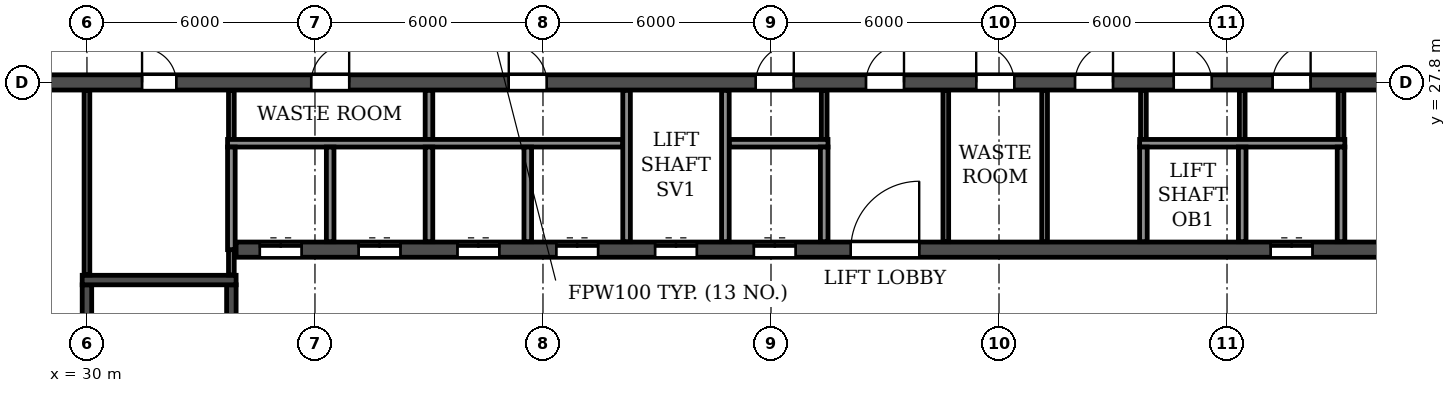
"""IFC4 building model, lengths in metres.
Left out: names, types, materials, properties, quantities, classifications, styles, units other than length and angle.
Written with IfcOpenShell. Run it as: python <this file> out.ifc"""

import sys

from ifc_helpers import new_model, si_unit, direction, frame, frame_2d, origin, place, context, subcontext, project, spatial, rectangle, extrude, element, fill, save


model = new_model("IFC4")
c1 = context("Model", 3, precision=1e-05, world=origin(), true_north=direction((0.0, 1.0)))
c2 = subcontext(c1, "Body", "Model", "MODEL_VIEW")
j1 = project(units=[si_unit("LENGTHUNIT", "METRE"), si_unit("PLANEANGLEUNIT", "RADIAN")], contexts=[c1])
p1 = place(None, origin())
s1 = spatial("IfcSite", under=j1, at=p1, CompositionType="ELEMENT")
p2 = place(p1, origin())
s2 = spatial("IfcBuilding", under=s1, at=p2, CompositionType="ELEMENT")
p3 = place(p2, frame((0.0, 0.0, 201.6)))
s3 = spatial("IfcBuildingStorey", under=s2, at=p3, CompositionType="ELEMENT", Elevation=201.6)
p4 = place(p3, frame((18.2, 27.8, 0.0), z_axis=(0.0, 0.0, 1.0), x_axis=(1.0, 0.0, 0.0)))
e1 = element("IfcWall", 1, at=p4, inside=s3, PredefinedType="SOLIDWALL", context=c2, shape_type="SweptSolid", body=[
    extrude(rectangle(XDim=65.6, YDim=0.4, at=frame_2d((32.8, 0.0))), origin(), (0.0, 0.0, 1.0), 3.08),
])
p5 = place(p4, frame((0.7, 0.0, 0.0)))
e2 = element("IfcOpeningElement", 2, at=p5, cuts=e1, PredefinedType="OPENING", context=c2, shape_type="SweptSolid", body=[
    extrude(rectangle(XDim=1.0, YDim=2.1, at=frame_2d((0.5, 1.05))), frame((0.0, 0.21, 0.0), z_axis=(0.0, -1.0, 0.0), x_axis=(1.0, 0.0, 0.0)), (0.0, 0.0, 1.0), 0.42),
])
p6 = place(p4, frame((4.05, 0.0, 0.0)))
e3 = element("IfcOpeningElement", 3, at=p6, cuts=e1, PredefinedType="OPENING", context=c2, shape_type="SweptSolid", body=[
    extrude(rectangle(XDim=0.9, YDim=2.1, at=frame_2d((0.45, 1.05))), frame((0.0, 0.21, 0.0), z_axis=(0.0, -1.0, 0.0), x_axis=(1.0, 0.0, 0.0)), (0.0, 0.0, 1.0), 0.42),
])
p7 = place(p4, frame((13.25, 0.0, 0.0)))
e4 = element("IfcOpeningElement", 4, at=p7, cuts=e1, PredefinedType="OPENING", context=c2, shape_type="SweptSolid", body=[
    extrude(rectangle(XDim=0.9, YDim=2.1, at=frame_2d((0.45, 1.05))), frame((0.0, 0.21, 0.0), z_axis=(0.0, -1.0, 0.0), x_axis=(1.0, 0.0, 0.0)), (0.0, 0.0, 1.0), 0.42),
])
p8 = place(p4, frame((17.7, 0.0, 0.0)))
e5 = element("IfcOpeningElement", 5, at=p8, cuts=e1, PredefinedType="OPENING", context=c2, shape_type="SweptSolid", body=[
    extrude(rectangle(XDim=1.0, YDim=2.1, at=frame_2d((0.5, 1.05))), frame((0.0, 0.21, 0.0), z_axis=(0.0, -1.0, 0.0), x_axis=(1.0, 0.0, 0.0)), (0.0, 0.0, 1.0), 0.42),
])
p9 = place(p4, frame((22.9, 0.0, 0.0)))
e6 = element("IfcOpeningElement", 6, at=p9, cuts=e1, PredefinedType="OPENING", context=c2, shape_type="SweptSolid", body=[
    extrude(rectangle(XDim=1.0, YDim=2.1, at=frame_2d((0.5, 1.05))), frame((0.0, 0.21, 0.0), z_axis=(0.0, -1.0, 0.0), x_axis=(1.0, 0.0, 0.0)), (0.0, 0.0, 1.0), 0.42),
])
p10 = place(p4, frame((29.4, 0.0, 0.0)))
e7 = element("IfcOpeningElement", 7, at=p10, cuts=e1, PredefinedType="OPENING", context=c2, shape_type="SweptSolid", body=[
    extrude(rectangle(XDim=1.0, YDim=2.1, at=frame_2d((0.5, 1.05))), frame((0.0, 0.21, 0.0), z_axis=(0.0, -1.0, 0.0), x_axis=(1.0, 0.0, 0.0)), (0.0, 0.0, 1.0), 0.42),
])
p11 = place(p4, frame((32.3, 0.0, 0.0)))
e8 = element("IfcOpeningElement", 8, at=p11, cuts=e1, PredefinedType="OPENING", context=c2, shape_type="SweptSolid", body=[
    extrude(rectangle(XDim=1.0, YDim=2.1, at=frame_2d((0.5, 1.05))), frame((0.0, 0.21, 0.0), z_axis=(0.0, -1.0, 0.0), x_axis=(1.0, 0.0, 0.0)), (0.0, 0.0, 1.0), 0.42),
])
p12 = place(p4, frame((35.2, 0.0, 0.0)))
e9 = element("IfcOpeningElement", 9, at=p12, cuts=e1, PredefinedType="OPENING", context=c2, shape_type="SweptSolid", body=[
    extrude(rectangle(XDim=1.0, YDim=2.1, at=frame_2d((0.5, 1.05))), frame((0.0, 0.21, 0.0), z_axis=(0.0, -1.0, 0.0), x_axis=(1.0, 0.0, 0.0)), (0.0, 0.0, 1.0), 0.42),
])
p13 = place(p4, frame((37.8, 0.0, 0.0)))
e10 = element("IfcOpeningElement", 10, at=p13, cuts=e1, PredefinedType="OPENING", context=c2, shape_type="SweptSolid", body=[
    extrude(rectangle(XDim=1.0, YDim=2.1, at=frame_2d((0.5, 1.05))), frame((0.0, 0.21, 0.0), z_axis=(0.0, -1.0, 0.0), x_axis=(1.0, 0.0, 0.0)), (0.0, 0.0, 1.0), 0.42),
])
p14 = place(p4, frame((40.4, 0.0, 0.0)))
e11 = element("IfcOpeningElement", 11, at=p14, cuts=e1, PredefinedType="OPENING", context=c2, shape_type="SweptSolid", body=[
    extrude(rectangle(XDim=1.0, YDim=2.1, at=frame_2d((0.5, 1.05))), frame((0.0, 0.21, 0.0), z_axis=(0.0, -1.0, 0.0), x_axis=(1.0, 0.0, 0.0)), (0.0, 0.0, 1.0), 0.42),
])
p15 = place(p4, frame((43.0, 0.0, 0.0)))
e12 = element("IfcOpeningElement", 12, at=p15, cuts=e1, PredefinedType="OPENING", context=c2, shape_type="SweptSolid", body=[
    extrude(rectangle(XDim=1.0, YDim=2.1, at=frame_2d((0.5, 1.05))), frame((0.0, 0.21, 0.0), z_axis=(0.0, -1.0, 0.0), x_axis=(1.0, 0.0, 0.0)), (0.0, 0.0, 1.0), 0.42),
])
p16 = place(p4, frame((46.9, 0.0, 0.0)))
e13 = element("IfcOpeningElement", 13, at=p16, cuts=e1, PredefinedType="OPENING", context=c2, shape_type="SweptSolid", body=[
    extrude(rectangle(XDim=1.0, YDim=2.1, at=frame_2d((0.5, 1.05))), frame((0.0, 0.21, 0.0), z_axis=(0.0, -1.0, 0.0), x_axis=(1.0, 0.0, 0.0)), (0.0, 0.0, 1.0), 0.42),
])
p17 = place(p4, frame((51.45, 0.0, 0.0)))
e14 = element("IfcOpeningElement", 14, at=p17, cuts=e1, PredefinedType="OPENING", context=c2, shape_type="SweptSolid", body=[
    extrude(rectangle(XDim=0.9, YDim=2.1, at=frame_2d((0.45, 1.05))), frame((0.0, 0.21, 0.0), z_axis=(0.0, -1.0, 0.0), x_axis=(1.0, 0.0, 0.0)), (0.0, 0.0, 1.0), 0.42),
])
p18 = place(p4, frame((60.65, 0.0, 0.0)))
e15 = element("IfcOpeningElement", 15, at=p18, cuts=e1, PredefinedType="OPENING", context=c2, shape_type="SweptSolid", body=[
    extrude(rectangle(XDim=0.9, YDim=2.1, at=frame_2d((0.45, 1.05))), frame((0.0, 0.21, 0.0), z_axis=(0.0, -1.0, 0.0), x_axis=(1.0, 0.0, 0.0)), (0.0, 0.0, 1.0), 0.42),
])
p19 = place(p4, frame((63.9, 0.0, 0.0)))
e16 = element("IfcOpeningElement", 16, at=p19, cuts=e1, PredefinedType="OPENING", context=c2, shape_type="SweptSolid", body=[
    extrude(rectangle(XDim=1.0, YDim=2.1, at=frame_2d((0.5, 1.05))), frame((0.0, 0.21, 0.0), z_axis=(0.0, -1.0, 0.0), x_axis=(1.0, 0.0, 0.0)), (0.0, 0.0, 1.0), 0.42),
])
p20 = place(p3, frame((33.925, 23.4, 0.0), z_axis=(0.0, 0.0, 1.0), x_axis=(1.0, 0.0, 0.0)))
e17 = element("IfcWall", 17, at=p20, inside=s3, PredefinedType="SOLIDWALL", context=c2, shape_type="SweptSolid", body=[
    extrude(rectangle(XDim=34.15, YDim=0.4, at=frame_2d((17.075, 0.0))), origin(), (0.0, 0.0, 1.0), 3.08),
])
p21 = place(p20, frame((16.175, 0.0, 0.0)))
e18 = element("IfcOpeningElement", 18, at=p21, cuts=e17, PredefinedType="OPENING", context=c2, shape_type="SweptSolid", body=[
    extrude(rectangle(XDim=1.8, YDim=2.1, at=frame_2d((0.9, 1.05))), frame((0.0, 0.21, 0.0), z_axis=(0.0, -1.0, 0.0), x_axis=(1.0, 0.0, 0.0)), (0.0, 0.0, 1.0), 0.42),
])
p22 = place(p20, frame((0.625, 0.0, 0.0)))
e19 = element("IfcOpeningElement", 19, at=p22, cuts=e17, PredefinedType="OPENING", context=c2, shape_type="SweptSolid", body=[
    extrude(rectangle(XDim=1.1, YDim=2.1, at=frame_2d((0.55, 1.05))), frame((0.0, 0.21, 0.0), z_axis=(0.0, -1.0, 0.0), x_axis=(1.0, 0.0, 0.0)), (0.0, 0.0, 1.0), 0.42),
])
p23 = place(p20, frame((3.225, 0.0, 0.0)))
e20 = element("IfcOpeningElement", 20, at=p23, cuts=e17, PredefinedType="OPENING", context=c2, shape_type="SweptSolid", body=[
    extrude(rectangle(XDim=1.1, YDim=2.1, at=frame_2d((0.55, 1.05))), frame((0.0, 0.21, 0.0), z_axis=(0.0, -1.0, 0.0), x_axis=(1.0, 0.0, 0.0)), (0.0, 0.0, 1.0), 0.42),
])
p24 = place(p20, frame((5.825, 0.0, 0.0)))
e21 = element("IfcOpeningElement", 21, at=p24, cuts=e17, PredefinedType="OPENING", context=c2, shape_type="SweptSolid", body=[
    extrude(rectangle(XDim=1.1, YDim=2.1, at=frame_2d((0.55, 1.05))), frame((0.0, 0.21, 0.0), z_axis=(0.0, -1.0, 0.0), x_axis=(1.0, 0.0, 0.0)), (0.0, 0.0, 1.0), 0.42),
])
p25 = place(p20, frame((8.425, 0.0, 0.0)))
e22 = element("IfcOpeningElement", 22, at=p25, cuts=e17, PredefinedType="OPENING", context=c2, shape_type="SweptSolid", body=[
    extrude(rectangle(XDim=1.1, YDim=2.1, at=frame_2d((0.55, 1.05))), frame((0.0, 0.21, 0.0), z_axis=(0.0, -1.0, 0.0), x_axis=(1.0, 0.0, 0.0)), (0.0, 0.0, 1.0), 0.42),
])
p26 = place(p20, frame((11.025, 0.0, 0.0)))
e23 = element("IfcOpeningElement", 23, at=p26, cuts=e17, PredefinedType="OPENING", context=c2, shape_type="SweptSolid", body=[
    extrude(rectangle(XDim=1.1, YDim=2.1, at=frame_2d((0.55, 1.05))), frame((0.0, 0.21, 0.0), z_axis=(0.0, -1.0, 0.0), x_axis=(1.0, 0.0, 0.0)), (0.0, 0.0, 1.0), 0.42),
])
p27 = place(p20, frame((13.625, 0.0, 0.0)))
e24 = element("IfcOpeningElement", 24, at=p27, cuts=e17, PredefinedType="OPENING", context=c2, shape_type="SweptSolid", body=[
    extrude(rectangle(XDim=1.1, YDim=2.1, at=frame_2d((0.55, 1.05))), frame((0.0, 0.21, 0.0), z_axis=(0.0, -1.0, 0.0), x_axis=(1.0, 0.0, 0.0)), (0.0, 0.0, 1.0), 0.42),
])
p28 = place(p20, frame((27.225, 0.0, 0.0)))
e25 = element("IfcOpeningElement", 25, at=p28, cuts=e17, PredefinedType="OPENING", context=c2, shape_type="SweptSolid", body=[
    extrude(rectangle(XDim=1.1, YDim=2.1, at=frame_2d((0.55, 1.05))), frame((0.0, 0.21, 0.0), z_axis=(0.0, -1.0, 0.0), x_axis=(1.0, 0.0, 0.0)), (0.0, 0.0, 1.0), 0.42),
])
p29 = place(p3, frame((30.0, 14.8, 0.0), z_axis=(0.0, 0.0, 1.0), x_axis=(0.0, 1.0, 0.0)))
e26 = element("IfcWall", 26, at=p29, inside=s3, PredefinedType="SOLIDWALL", context=c2, shape_type="SweptSolid", body=[
    extrude(rectangle(XDim=7.675, YDim=0.25, at=frame_2d((3.837, 0.0))), origin(), (0.0, 0.0, 1.0), 3.08),
])
p30 = place(p3, frame((33.8, 14.8, 0.0), z_axis=(0.0, 0.0, 1.0), x_axis=(0.0, 1.0, 0.0)))
e27 = element("IfcWall", 27, at=p30, inside=s3, PredefinedType="SOLIDWALL", context=c2, shape_type="SweptSolid", body=[
    extrude(rectangle(XDim=7.675, YDim=0.25, at=frame_2d((3.837, 0.0))), origin(), (0.0, 0.0, 1.0), 3.08),
])
p31 = place(p30, frame((0.5, 0.0, 0.0)))
e28 = element("IfcOpeningElement", 28, at=p31, cuts=e27, PredefinedType="OPENING", context=c2, shape_type="SweptSolid", body=[
    extrude(rectangle(XDim=1.0, YDim=2.1, at=frame_2d((0.5, 1.05))), frame((0.0, 0.135, 0.0), z_axis=(0.0, -1.0, 0.0), x_axis=(1.0, 0.0, 0.0)), (0.0, 0.0, 1.0), 0.27),
])
p32 = place(p3, frame((29.875, 22.6, 0.0), z_axis=(0.0, 0.0, 1.0), x_axis=(1.0, 0.0, 0.0)))
e29 = element("IfcWall", 29, at=p32, inside=s3, PredefinedType="SOLIDWALL", context=c2, shape_type="SweptSolid", body=[
    extrude(rectangle(XDim=4.05, YDim=0.25, at=frame_2d((2.025, 0.0))), origin(), (0.0, 0.0, 1.0), 3.08),
])
p33 = place(p3, frame((49.4, 26.3, 0.0), z_axis=(0.0, 0.0, 1.0), x_axis=(0.0, 1.0, 0.0)))
e30 = element("IfcWall", 30, at=p33, inside=s3, PredefinedType="PARTITIONING", context=c2, shape_type="SweptSolid", body=[
    extrude(rectangle(XDim=1.29, YDim=0.15, at=frame_2d((0.645, 0.0))), origin(), (0.0, 0.0, 1.0), 3.08),
])
for number, where, z_axis, x_axis in (
    (31, (52.6, 23.61, 0.0), (0.0, 0.0, 1.0), (0.0, 1.0, 0.0)),
    (32, (55.2, 23.61, 0.0), (0.0, 0.0, 1.0), (0.0, 1.0, 0.0)),
):
    element("IfcWall", number, at=place(p3, frame(where, z_axis=z_axis, x_axis=x_axis)), inside=s3, PredefinedType="PARTITIONING", context=c2, shape_type="SweptSolid", body=[
        extrude(rectangle(XDim=3.98, YDim=0.15, at=frame_2d((1.99, 0.0))), origin(), (0.0, 0.0, 1.0), 3.08),
    ])
for number, where, z_axis, x_axis in (
    (33, (57.8, 26.3, 0.0), (0.0, 0.0, 1.0), (0.0, 1.0, 0.0)),
    (34, (60.4, 26.3, 0.0), (0.0, 0.0, 1.0), (0.0, 1.0, 0.0)),
    (35, (63.0, 26.3, 0.0), (0.0, 0.0, 1.0), (0.0, 1.0, 0.0)),
):
    element("IfcWall", number, at=place(p3, frame(where, z_axis=z_axis, x_axis=x_axis)), inside=s3, PredefinedType="PARTITIONING", context=c2, shape_type="SweptSolid", body=[
        extrude(rectangle(XDim=1.29, YDim=0.15, at=frame_2d((0.645, 0.0))), origin(), (0.0, 0.0, 1.0), 3.08),
    ])
p34 = place(p3, frame((39.0, 26.3, 0.0), z_axis=(0.0, 0.0, 1.0), x_axis=(0.0, 1.0, 0.0)))
e36 = element("IfcWall", 36, at=p34, inside=s3, PredefinedType="PARTITIONING", context=c2, shape_type="SweptSolid", body=[
    extrude(rectangle(XDim=1.29, YDim=0.2, at=frame_2d((0.645, 0.0))), origin(), (0.0, 0.0, 1.0), 3.08),
])
p35 = place(p3, frame((30.0, 22.735, 0.0), z_axis=(0.0, 0.0, 1.0), x_axis=(0.0, 1.0, 0.0)))
e37 = element("IfcWall", 37, at=p35, inside=s3, PredefinedType="PARTITIONING", context=c2, shape_type="SweptSolid", body=[
    extrude(rectangle(XDim=4.855, YDim=0.15, at=frame_2d((2.427, 0.0))), origin(), (0.0, 0.0, 1.0), 3.08),
])
p36 = place(p3, frame((33.8, 22.735, 0.0), z_axis=(0.0, 0.0, 1.0), x_axis=(0.0, 1.0, 0.0)))
e38 = element("IfcWall", 38, at=p36, inside=s3, PredefinedType="PARTITIONING", context=c2, shape_type="SweptSolid", body=[
    extrude(rectangle(XDim=0.665, YDim=0.15, at=frame_2d((0.333, 0.0))), origin(), (0.0, 0.0, 1.0), 3.08),
])
p37 = place(p3, frame((33.8, 26.3, 0.0), z_axis=(0.0, 0.0, 1.0), x_axis=(0.0, 1.0, 0.0)))
e39 = element("IfcWall", 39, at=p37, inside=s3, PredefinedType="PARTITIONING", context=c2, shape_type="SweptSolid", body=[
    extrude(rectangle(XDim=1.29, YDim=0.15, at=frame_2d((0.645, 0.0))), origin(), (0.0, 0.0, 1.0), 3.08),
])
p38 = place(p3, frame((33.7, 26.2, 0.0), z_axis=(0.0, 0.0, 1.0), x_axis=(1.0, 0.0, 0.0)))
e40 = element("IfcWall", 40, at=p38, inside=s3, PredefinedType="PARTITIONING", context=c2, shape_type="SweptSolid", body=[
    extrude(rectangle(XDim=10.4, YDim=0.2, at=frame_2d((5.2, 0.0))), origin(), (0.0, 0.0, 1.0), 3.08),
])
p39 = place(p3, frame((46.9, 26.2, 0.0), z_axis=(0.0, 0.0, 1.0), x_axis=(1.0, 0.0, 0.0)))
e41 = element("IfcWall", 41, at=p39, inside=s3, PredefinedType="PARTITIONING", context=c2, shape_type="SweptSolid", body=[
    extrude(rectangle(XDim=2.6, YDim=0.2, at=frame_2d((1.3, 0.0))), origin(), (0.0, 0.0, 1.0), 3.08),
])
p40 = place(p3, frame((57.7, 26.2, 0.0), z_axis=(0.0, 0.0, 1.0), x_axis=(1.0, 0.0, 0.0)))
e42 = element("IfcWall", 42, at=p40, inside=s3, PredefinedType="PARTITIONING", context=c2, shape_type="SweptSolid", body=[
    extrude(rectangle(XDim=5.4, YDim=0.2, at=frame_2d((2.7, 0.0))), origin(), (0.0, 0.0, 1.0), 3.08),
])
p41 = place(p3, frame((33.8, 23.4, 0.0), z_axis=(0.0, 0.0, 1.0), x_axis=(0.0, 1.0, 0.0)))
e43 = element("IfcWall", 43, at=p41, inside=s3, PredefinedType="PARTITIONING", context=c2, shape_type="SweptSolid", body=[
    extrude(rectangle(XDim=2.7, YDim=0.2, at=frame_2d((1.35, 0.0))), origin(), (0.0, 0.0, 1.0), 3.08),
])
for number, where, z_axis, x_axis in (
    (44, (36.4, 23.61, 0.0), (0.0, 0.0, 1.0), (0.0, 1.0, 0.0)),
    (45, (39.0, 23.61, 0.0), (0.0, 0.0, 1.0), (0.0, 1.0, 0.0)),
    (46, (41.6, 23.61, 0.0), (0.0, 0.0, 1.0), (0.0, 1.0, 0.0)),
):
    element("IfcWall", number, at=place(p3, frame(where, z_axis=z_axis, x_axis=x_axis)), inside=s3, PredefinedType="PARTITIONING", context=c2, shape_type="SweptSolid", body=[
        extrude(rectangle(XDim=2.49, YDim=0.2, at=frame_2d((1.245, 0.0))), origin(), (0.0, 0.0, 1.0), 3.08),
    ])
for number, where, z_axis, x_axis in (
    (47, (44.2, 23.61, 0.0), (0.0, 0.0, 1.0), (0.0, 1.0, 0.0)),
    (48, (46.8, 23.61, 0.0), (0.0, 0.0, 1.0), (0.0, 1.0, 0.0)),
):
    element("IfcWall", number, at=place(p3, frame(where, z_axis=z_axis, x_axis=x_axis)), inside=s3, PredefinedType="PARTITIONING", context=c2, shape_type="SweptSolid", body=[
        extrude(rectangle(XDim=3.98, YDim=0.2, at=frame_2d((1.99, 0.0))), origin(), (0.0, 0.0, 1.0), 3.08),
    ])
for number, where, z_axis, x_axis in (
    (49, (49.4, 23.61, 0.0), (0.0, 0.0, 1.0), (0.0, 1.0, 0.0)),
    (50, (57.8, 23.61, 0.0), (0.0, 0.0, 1.0), (0.0, 1.0, 0.0)),
    (51, (60.4, 23.61, 0.0), (0.0, 0.0, 1.0), (0.0, 1.0, 0.0)),
    (52, (63.0, 23.61, 0.0), (0.0, 0.0, 1.0), (0.0, 1.0, 0.0)),
):
    element("IfcWall", number, at=place(p3, frame(where, z_axis=z_axis, x_axis=x_axis)), inside=s3, PredefinedType="PARTITIONING", context=c2, shape_type="SweptSolid", body=[
        extrude(rectangle(XDim=2.49, YDim=0.2, at=frame_2d((1.245, 0.0))), origin(), (0.0, 0.0, 1.0), 3.08),
    ])
p42 = place(p7, origin())
e53 = element("IfcDoor", 53, at=p42, inside=s3, OperationType="SINGLE_SWING_LEFT", PredefinedType="DOOR", context=c2, shape_type="SweptSolid", body=[
    extrude(rectangle(XDim=0.9, YDim=2.1, at=frame_2d((0.45, 1.05))), frame((0.0, 0.025, 0.0), z_axis=(0.0, -1.0, 0.0), x_axis=(1.0, 0.0, 0.0)), (0.0, 0.0, 1.0), 0.05),
])
fill(e4, e53)
p43 = place(p8, origin())
e54 = element("IfcDoor", 54, at=p43, inside=s3, OperationType="SINGLE_SWING_RIGHT", PredefinedType="DOOR", context=c2, shape_type="SweptSolid", body=[
    extrude(rectangle(XDim=1.0, YDim=2.1, at=frame_2d((0.5, 1.05))), frame((0.0, 0.025, 0.0), z_axis=(0.0, -1.0, 0.0), x_axis=(1.0, 0.0, 0.0)), (0.0, 0.0, 1.0), 0.05),
])
fill(e5, e54)
p44 = place(p9, origin())
e55 = element("IfcDoor", 55, at=p44, inside=s3, OperationType="SINGLE_SWING_LEFT", PredefinedType="DOOR", context=c2, shape_type="SweptSolid", body=[
    extrude(rectangle(XDim=1.0, YDim=2.1, at=frame_2d((0.5, 1.05))), frame((0.0, 0.025, 0.0), z_axis=(0.0, -1.0, 0.0), x_axis=(1.0, 0.0, 0.0)), (0.0, 0.0, 1.0), 0.05),
])
fill(e6, e55)
p45 = place(p10, origin())
e56 = element("IfcDoor", 56, at=p45, inside=s3, OperationType="SINGLE_SWING_RIGHT", PredefinedType="DOOR", context=c2, shape_type="SweptSolid", body=[
    extrude(rectangle(XDim=1.0, YDim=2.1, at=frame_2d((0.5, 1.05))), frame((0.0, 0.025, 0.0), z_axis=(0.0, -1.0, 0.0), x_axis=(1.0, 0.0, 0.0)), (0.0, 0.0, 1.0), 0.05),
])
fill(e7, e56)
p46 = place(p11, origin())
e57 = element("IfcDoor", 57, at=p46, inside=s3, OperationType="SINGLE_SWING_RIGHT", PredefinedType="DOOR", context=c2, shape_type="SweptSolid", body=[
    extrude(rectangle(XDim=1.0, YDim=2.1, at=frame_2d((0.5, 1.05))), frame((0.0, 0.025, 0.0), z_axis=(0.0, -1.0, 0.0), x_axis=(1.0, 0.0, 0.0)), (0.0, 0.0, 1.0), 0.05),
])
fill(e8, e57)
p47 = place(p12, origin())
e58 = element("IfcDoor", 58, at=p47, inside=s3, OperationType="SINGLE_SWING_LEFT", PredefinedType="DOOR", context=c2, shape_type="SweptSolid", body=[
    extrude(rectangle(XDim=1.0, YDim=2.1, at=frame_2d((0.5, 1.05))), frame((0.0, 0.025, 0.0), z_axis=(0.0, -1.0, 0.0), x_axis=(1.0, 0.0, 0.0)), (0.0, 0.0, 1.0), 0.05),
])
fill(e9, e58)
p48 = place(p13, origin())
e59 = element("IfcDoor", 59, at=p48, inside=s3, OperationType="SINGLE_SWING_RIGHT", PredefinedType="DOOR", context=c2, shape_type="SweptSolid", body=[
    extrude(rectangle(XDim=1.0, YDim=2.1, at=frame_2d((0.5, 1.05))), frame((0.0, 0.025, 0.0), z_axis=(0.0, -1.0, 0.0), x_axis=(1.0, 0.0, 0.0)), (0.0, 0.0, 1.0), 0.05),
])
fill(e10, e59)
p49 = place(p14, origin())
e60 = element("IfcDoor", 60, at=p49, inside=s3, OperationType="SINGLE_SWING_LEFT", PredefinedType="DOOR", context=c2, shape_type="SweptSolid", body=[
    extrude(rectangle(XDim=1.0, YDim=2.1, at=frame_2d((0.5, 1.05))), frame((0.0, 0.025, 0.0), z_axis=(0.0, -1.0, 0.0), x_axis=(1.0, 0.0, 0.0)), (0.0, 0.0, 1.0), 0.05),
])
fill(e11, e60)
p50 = place(p15, origin())
e61 = element("IfcDoor", 61, at=p50, inside=s3, OperationType="SINGLE_SWING_RIGHT", PredefinedType="DOOR", context=c2, shape_type="SweptSolid", body=[
    extrude(rectangle(XDim=1.0, YDim=2.1, at=frame_2d((0.5, 1.05))), frame((0.0, 0.025, 0.0), z_axis=(0.0, -1.0, 0.0), x_axis=(1.0, 0.0, 0.0)), (0.0, 0.0, 1.0), 0.05),
])
fill(e12, e61)
p51 = place(p21, origin())
e62 = element("IfcDoor", 62, at=p51, inside=s3, OperationType="DOUBLE_DOOR_SINGLE_SWING", PredefinedType="DOOR", context=c2, shape_type="SweptSolid", body=[
    extrude(rectangle(XDim=1.8, YDim=2.1, at=frame_2d((0.9, 1.05))), frame((0.0, 0.025, 0.0), z_axis=(0.0, -1.0, 0.0), x_axis=(1.0, 0.0, 0.0)), (0.0, 0.0, 1.0), 0.05),
])
fill(e18, e62)
p52 = place(p22, origin())
e63 = element("IfcDoor", 63, at=p52, inside=s3, OperationType="DOUBLE_DOOR_SLIDING", PredefinedType="DOOR", context=c2, shape_type="SweptSolid", body=[
    extrude(rectangle(XDim=1.1, YDim=2.1, at=frame_2d((0.55, 1.05))), frame((0.0, 0.025, 0.0), z_axis=(0.0, -1.0, 0.0), x_axis=(1.0, 0.0, 0.0)), (0.0, 0.0, 1.0), 0.05),
])
fill(e19, e63)
p53 = place(p23, origin())
e64 = element("IfcDoor", 64, at=p53, inside=s3, OperationType="DOUBLE_DOOR_SLIDING", PredefinedType="DOOR", context=c2, shape_type="SweptSolid", body=[
    extrude(rectangle(XDim=1.1, YDim=2.1, at=frame_2d((0.55, 1.05))), frame((0.0, 0.025, 0.0), z_axis=(0.0, -1.0, 0.0), x_axis=(1.0, 0.0, 0.0)), (0.0, 0.0, 1.0), 0.05),
])
fill(e20, e64)
p54 = place(p24, origin())
e65 = element("IfcDoor", 65, at=p54, inside=s3, OperationType="DOUBLE_DOOR_SLIDING", PredefinedType="DOOR", context=c2, shape_type="SweptSolid", body=[
    extrude(rectangle(XDim=1.1, YDim=2.1, at=frame_2d((0.55, 1.05))), frame((0.0, 0.025, 0.0), z_axis=(0.0, -1.0, 0.0), x_axis=(1.0, 0.0, 0.0)), (0.0, 0.0, 1.0), 0.05),
])
fill(e21, e65)
p55 = place(p25, origin())
e66 = element("IfcDoor", 66, at=p55, inside=s3, OperationType="DOUBLE_DOOR_SLIDING", PredefinedType="DOOR", context=c2, shape_type="SweptSolid", body=[
    extrude(rectangle(XDim=1.1, YDim=2.1, at=frame_2d((0.55, 1.05))), frame((0.0, 0.025, 0.0), z_axis=(0.0, -1.0, 0.0), x_axis=(1.0, 0.0, 0.0)), (0.0, 0.0, 1.0), 0.05),
])
fill(e22, e66)
p56 = place(p26, origin())
e67 = element("IfcDoor", 67, at=p56, inside=s3, OperationType="DOUBLE_DOOR_SLIDING", PredefinedType="DOOR", context=c2, shape_type="SweptSolid", body=[
    extrude(rectangle(XDim=1.1, YDim=2.1, at=frame_2d((0.55, 1.05))), frame((0.0, 0.025, 0.0), z_axis=(0.0, -1.0, 0.0), x_axis=(1.0, 0.0, 0.0)), (0.0, 0.0, 1.0), 0.05),
])
fill(e23, e67)
p57 = place(p27, origin())
e68 = element("IfcDoor", 68, at=p57, inside=s3, OperationType="DOUBLE_DOOR_SLIDING", PredefinedType="DOOR", context=c2, shape_type="SweptSolid", body=[
    extrude(rectangle(XDim=1.1, YDim=2.1, at=frame_2d((0.55, 1.05))), frame((0.0, 0.025, 0.0), z_axis=(0.0, -1.0, 0.0), x_axis=(1.0, 0.0, 0.0)), (0.0, 0.0, 1.0), 0.05),
])
fill(e24, e68)
p58 = place(p28, origin())
e69 = element("IfcDoor", 69, at=p58, inside=s3, OperationType="DOUBLE_DOOR_SLIDING", PredefinedType="DOOR", context=c2, shape_type="SweptSolid", body=[
    extrude(rectangle(XDim=1.1, YDim=2.1, at=frame_2d((0.55, 1.05))), frame((0.0, 0.025, 0.0), z_axis=(0.0, -1.0, 0.0), x_axis=(1.0, 0.0, 0.0)), (0.0, 0.0, 1.0), 0.05),
])
fill(e25, e69)
save(model, sys.argv[1])
